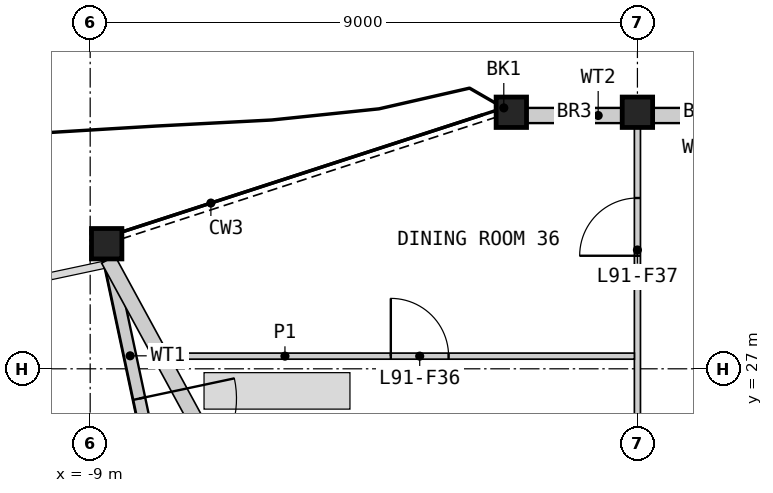
"""IFC4 building model, lengths in metres.
Left out: names, types, materials, properties, quantities, classifications, styles, units other than length and angle.
Written with IfcOpenShell. Run it as: python <this file> out.ifc"""

import sys

from ifc_helpers import new_model, si_unit, direction, frame, frame_2d, origin, origin_2d, place, context, subcontext, project, spatial, rectangle, hollow_rectangle, extrude, element, fill, save


model = new_model("IFC4")
c1 = context("Model", 3, precision=1e-05, world=origin(), true_north=direction((0.0, 1.0)))
c2 = subcontext(c1, "Body", "Model", "MODEL_VIEW")
j1 = project(units=[si_unit("LENGTHUNIT", "METRE"), si_unit("PLANEANGLEUNIT", "RADIAN")], contexts=[c1])
p1 = place(None, origin())
s1 = spatial("IfcSite", under=j1, at=p1, CompositionType="ELEMENT")
p2 = place(p1, origin())
s2 = spatial("IfcBuilding", under=s1, at=p2, CompositionType="ELEMENT")
p3 = place(p2, frame((0.0, 0.0, 398.4)))
s3 = spatial("IfcBuildingStorey", under=s2, at=p3, CompositionType="ELEMENT", Elevation=398.4)
for number, where, z_axis, x_axis in (
    (1, (0.0, 31.219, 0.0), (0.0, 0.0, 1.0), (1.0, 0.0, 0.0)),
    (2, (-2.074, 31.219, 0.0), (0.0, 0.0, 1.0), (1.0, 0.0, 0.0)),
    (3, (-8.729, 29.057, 0.0), (0.0, 0.0, 1.0), (1.0, 0.0, 0.0)),
):
    element("IfcColumn", number, at=place(p3, frame(where, z_axis=z_axis, x_axis=x_axis)), inside=s3, PredefinedType="COLUMN", context=c2, shape_type="SweptSolid", body=[
        extrude(hollow_rectangle(XDim=0.5, YDim=0.5, WallThickness=0.03, at=origin_2d()), origin(), (0.0, 0.0, 1.0), 3.4),
    ])
p4 = place(p3, frame((1.832, 31.166, 0.0), z_axis=(0.0, 0.0, 1.0), x_axis=(-1.0, 0.0, 0.0)))
e4 = element("IfcWall", 4, at=p4, inside=s3, PredefinedType="SOLIDWALL", context=c2, shape_type="SweptSolid", body=[
    extrude(rectangle(XDim=1.582, YDim=0.25, at=frame_2d((0.791, 0.0))), origin(), (0.0, 0.0, 1.0), 2.634),
])
p5 = place(p4, frame((0.25, 0.0, 1.7)))
e5 = element("IfcOpeningElement", 5, at=p5, cuts=e4, PredefinedType="OPENING", context=c2, shape_type="SweptSolid", body=[
    extrude(rectangle(XDim=0.6, YDim=0.7, at=frame_2d((0.3, 0.35))), frame((0.0, 0.135, 0.0), z_axis=(0.0, -1.0, 0.0), x_axis=(1.0, 0.0, 0.0)), (0.0, 0.0, 1.0), 0.27),
])
p6 = place(p3, frame((-0.25, 31.166, 0.0), z_axis=(0.0, 0.0, 1.0), x_axis=(-1.0, 0.0, 0.0)))
e6 = element("IfcWall", 6, at=p6, inside=s3, PredefinedType="SOLIDWALL", context=c2, shape_type="SweptSolid", body=[
    extrude(rectangle(XDim=1.582, YDim=0.25, at=frame_2d((0.791, 0.0))), origin(), (0.0, 0.0, 1.0), 2.634),
])
p7 = place(p3, frame((-8.679, 28.792, 0.0), z_axis=(0.0, 0.0, 1.0), x_axis=(0.207932057694, -0.978143271399, 0.0)))
e7 = element("IfcWall", 7, at=p7, inside=s3, PredefinedType="SOLIDWALL", context=c2, shape_type="SweptSolid", body=[
    extrude(rectangle(XDim=6.453, YDim=0.2, at=frame_2d((3.227, 0.0))), origin(), (0.0, 0.0, 1.0), 2.634),
])
p8 = place(p7, frame((2.333, 0.0, 0.0)))
e8 = element("IfcOpeningElement", 8, at=p8, cuts=e7, PredefinedType="OPENING", context=c2, shape_type="SweptSolid", body=[
    extrude(rectangle(XDim=1.6, YDim=2.25, at=frame_2d((0.8, 1.125))), frame((0.0, 0.11, 0.0), z_axis=(0.0, -1.0, 0.0), x_axis=(1.0, 0.0, 0.0)), (0.0, 0.0, 1.0), 0.22),
])
p9 = place(p3, frame((-8.702, 28.797, 0.0), z_axis=(0.0, 0.0, 1.0), x_axis=(0.47791275145, -0.878407309852, 0.0)))
e9 = element("IfcWall", 9, at=p9, inside=s3, PredefinedType="PARTITIONING", context=c2, shape_type="SweptSolid", body=[
    extrude(rectangle(XDim=14.226, YDim=0.25, at=frame_2d((7.113, 0.0))), origin(), (0.0, 0.0, 1.0), 2.33),
])
p10 = place(p3, frame((0.0, 20.008, 0.0), z_axis=(0.0, 0.0, 1.0), x_axis=(0.0, 1.0, 0.0)))
e10 = element("IfcWall", 10, at=p10, inside=s3, PredefinedType="PARTITIONING", context=c2, shape_type="SweptSolid", body=[
    extrude(rectangle(XDim=10.951, YDim=0.1, at=frame_2d((5.476, 0.0))), origin(), (0.0, 0.0, 1.0), 2.33),
])
p11 = place(p10, frame((8.851, 0.0, 0.0)))
e11 = element("IfcOpeningElement", 11, at=p11, cuts=e10, PredefinedType="OPENING", context=c2, shape_type="SweptSolid", body=[
    extrude(rectangle(XDim=0.95, YDim=2.1, at=frame_2d((0.475, 1.05))), frame((0.0, 0.06, 0.0), z_axis=(0.0, -1.0, 0.0), x_axis=(1.0, 0.0, 0.0)), (0.0, 0.0, 1.0), 0.12),
])
p12 = place(p3, frame((-7.712, 27.208, 0.0), z_axis=(0.0, 0.0, 1.0), x_axis=(1.0, 0.0, 0.0)))
e12 = element("IfcWall", 12, at=p12, inside=s3, PredefinedType="PARTITIONING", context=c2, shape_type="SweptSolid", body=[
    extrude(rectangle(XDim=7.662, YDim=0.1, at=frame_2d((3.831, 0.0))), origin(), (0.0, 0.0, 1.0), 2.33),
])
p13 = place(p12, frame((3.657, 0.0, 0.0)))
e13 = element("IfcOpeningElement", 13, at=p13, cuts=e12, PredefinedType="OPENING", context=c2, shape_type="SweptSolid", body=[
    extrude(rectangle(XDim=0.95, YDim=2.1, at=frame_2d((0.475, 1.05))), frame((0.0, 0.06, 0.0), z_axis=(0.0, -1.0, 0.0), x_axis=(1.0, 0.0, 0.0)), (0.0, 0.0, 1.0), 0.12),
])
p14 = place(p8, origin())
e14 = element("IfcDoor", 14, at=p14, inside=s3, OperationType="DOUBLE_DOOR_SINGLE_SWING", PredefinedType="DOOR", context=c2, shape_type="SweptSolid", body=[
    extrude(rectangle(XDim=1.6, YDim=2.25, at=frame_2d((0.8, 1.125))), frame((0.0, 0.025, 0.0), z_axis=(0.0, -1.0, 0.0), x_axis=(1.0, 0.0, 0.0)), (0.0, 0.0, 1.0), 0.05),
])
fill(e8, e14)
p15 = place(p13, origin())
e15 = element("IfcDoor", 15, at=p15, inside=s3, OperationType="SINGLE_SWING_LEFT", PredefinedType="DOOR", context=c2, shape_type="SweptSolid", body=[
    extrude(rectangle(XDim=0.95, YDim=2.1, at=frame_2d((0.475, 1.05))), frame((0.0, 0.025, 0.0), z_axis=(0.0, -1.0, 0.0), x_axis=(1.0, 0.0, 0.0)), (0.0, 0.0, 1.0), 0.05),
])
fill(e13, e15)
p16 = place(p11, origin())
e16 = element("IfcDoor", 16, at=p16, inside=s3, OperationType="SINGLE_SWING_LEFT", PredefinedType="DOOR", context=c2, shape_type="SweptSolid", body=[
    extrude(rectangle(XDim=0.95, YDim=2.1, at=frame_2d((0.475, 1.05))), frame((0.0, 0.025, 0.0), z_axis=(0.0, -1.0, 0.0), x_axis=(1.0, 0.0, 0.0)), (0.0, 0.0, 1.0), 0.05),
])
fill(e11, e16)
save(model, sys.argv[1])
